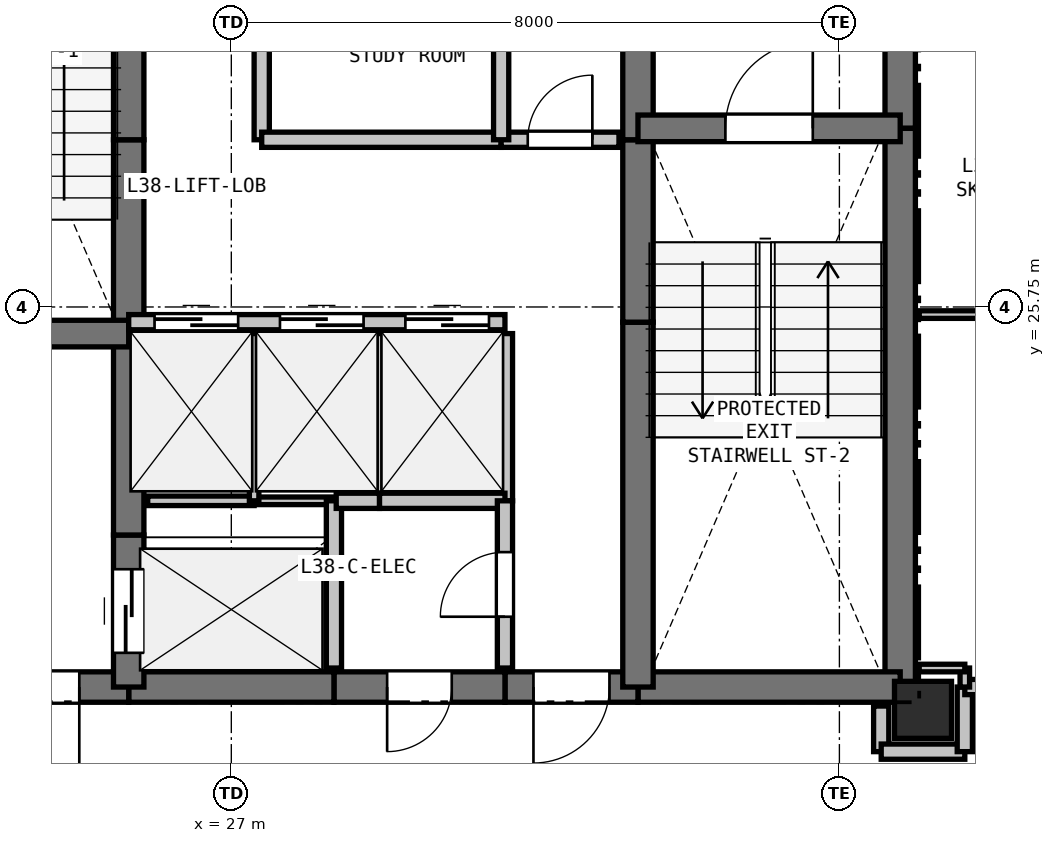
"""IFC4 building model, lengths in metres.
Left out: names, types, materials, properties, quantities, classifications, styles, units other than length and angle.
Written with IfcOpenShell. Run it as: python <this file> out.ifc"""

import sys

from ifc_helpers import new_model, si_unit, direction, frame, frame_2d, origin, origin_2d, place, context, subcontext, project, spatial, rectangle, extrude, element, fill, save


model = new_model("IFC4")
c1 = context("Model", 3, precision=1e-05, world=origin(), true_north=direction((0.0, 1.0)))
c2 = subcontext(c1, "Body", "Model", "MODEL_VIEW")
j1 = project(units=[si_unit("LENGTHUNIT", "METRE"), si_unit("PLANEANGLEUNIT", "RADIAN")], contexts=[c1])
p1 = place(None, origin())
s1 = spatial("IfcSite", under=j1, at=p1, CompositionType="ELEMENT")
p2 = place(p1, origin())
s2 = spatial("IfcBuilding", under=s1, at=p2, CompositionType="ELEMENT")
p3 = place(p2, frame((0.0, 0.0, 137.7)))
s3 = spatial("IfcBuildingStorey", under=s2, at=p3, CompositionType="ELEMENT", Elevation=137.7)
p4 = place(p3, frame((36.1, 20.45, 0.0), z_axis=(0.0, 0.0, 1.0), x_axis=(1.0, 0.0, 0.0)))
e1 = element("IfcColumn", 1, at=p4, inside=s3, PredefinedType="COLUMN", context=c2, shape_type="SweptSolid", body=[
    extrude(rectangle(XDim=0.75, YDim=0.75, at=origin_2d()), origin(), (0.0, 0.0, 1.0), 3.3),
])
p5 = place(p3, frame((35.8, 32.75, 0.0), z_axis=(0.0, 0.0, 1.0), x_axis=(0.0, -1.0, 0.0)))
e2 = element("IfcWall", 2, at=p5, inside=s3, PredefinedType="SHEAR", context=c2, shape_type="SweptSolid", body=[
    extrude(rectangle(XDim=4.65, YDim=0.4, at=frame_2d((2.325, 0.0))), origin(), (0.0, 0.0, 1.0), 3.06),
])
p6 = place(p3, frame((35.8, 28.1, 0.0), z_axis=(0.0, 0.0, 1.0), x_axis=(0.0, -1.0, 0.0)))
e3 = element("IfcWall", 3, at=p6, inside=s3, PredefinedType="SHEAR", context=c2, shape_type="SweptSolid", body=[
    extrude(rectangle(XDim=7.35, YDim=0.4, at=frame_2d((3.675, 0.0))), origin(), (0.0, 0.0, 1.0), 3.06),
])
p7 = place(p3, frame((35.8, 20.75, 0.0), z_axis=(0.0, 0.0, 1.0), x_axis=(-1.0, 0.0, 0.0)))
e4 = element("IfcWall", 4, at=p7, inside=s3, PredefinedType="SHEAR", context=c2, shape_type="SweptSolid", body=[
    extrude(rectangle(XDim=3.45, YDim=0.4, at=frame_2d((1.725, 0.0))), origin(), (0.0, 0.0, 1.0), 3.06),
])
p8 = place(p3, frame((32.35, 20.75, 0.0), z_axis=(0.0, 0.0, 1.0), x_axis=(-1.0, 0.0, 0.0)))
e5 = element("IfcWall", 5, at=p8, inside=s3, PredefinedType="SHEAR", context=c2, shape_type="SweptSolid", body=[
    extrude(rectangle(XDim=1.75, YDim=0.4, at=frame_2d((0.875, 0.0))), origin(), (0.0, 0.0, 1.0), 3.06),
])
p9 = place(p8, frame((0.375, 0.0, 0.0)))
e6 = element("IfcOpeningElement", 6, at=p9, cuts=e5, PredefinedType="OPENING", context=c2, shape_type="SweptSolid", body=[
    extrude(rectangle(XDim=1.0, YDim=2.15, at=frame_2d((0.5, 1.075))), frame((0.0, 0.21, 0.0), z_axis=(0.0, -1.0, 0.0), x_axis=(1.0, 0.0, 0.0)), (0.0, 0.0, 1.0), 0.42),
])
p10 = place(p3, frame((30.6, 20.75, 0.0), z_axis=(0.0, 0.0, 1.0), x_axis=(-1.0, 0.0, 0.0)))
e7 = element("IfcWall", 7, at=p10, inside=s3, PredefinedType="SHEAR", context=c2, shape_type="SweptSolid", body=[
    extrude(rectangle(XDim=2.25, YDim=0.4, at=frame_2d((1.125, 0.0))), origin(), (0.0, 0.0, 1.0), 3.06),
])
p11 = place(p10, frame((0.7, 0.0, 0.0)))
e8 = element("IfcOpeningElement", 8, at=p11, cuts=e7, PredefinedType="OPENING", context=c2, shape_type="SweptSolid", body=[
    extrude(rectangle(XDim=0.85, YDim=2.1, at=frame_2d((0.425, 1.05))), frame((0.0, 0.21, 0.0), z_axis=(0.0, -1.0, 0.0), x_axis=(1.0, 0.0, 0.0)), (0.0, 0.0, 1.0), 0.42),
])
p12 = place(p3, frame((28.35, 20.75, 0.0), z_axis=(0.0, 0.0, 1.0), x_axis=(-1.0, 0.0, 0.0)))
e9 = element("IfcWall", 9, at=p12, inside=s3, PredefinedType="SHEAR", context=c2, shape_type="SweptSolid", body=[
    extrude(rectangle(XDim=2.7, YDim=0.4, at=frame_2d((1.35, 0.0))), origin(), (0.0, 0.0, 1.0), 3.06),
])
p13 = place(p3, frame((25.65, 20.75, 0.0), z_axis=(0.0, 0.0, 1.0), x_axis=(-1.0, 0.0, 0.0)))
e10 = element("IfcWall", 10, at=p13, inside=s3, PredefinedType="SHEAR", context=c2, shape_type="SweptSolid", body=[
    extrude(rectangle(XDim=3.45, YDim=0.4, at=frame_2d((1.725, 0.0))), origin(), (0.0, 0.0, 1.0), 3.06),
])
p14 = place(p13, frame((0.65, 0.0, 0.0)))
e11 = element("IfcOpeningElement", 11, at=p14, cuts=e10, PredefinedType="OPENING", context=c2, shape_type="SweptSolid", body=[
    extrude(rectangle(XDim=1.15, YDim=2.15, at=frame_2d((0.575, 1.075))), frame((0.0, 0.21, 0.0), z_axis=(0.0, -1.0, 0.0), x_axis=(1.0, 0.0, 0.0)), (0.0, 0.0, 1.0), 0.42),
])
p15 = place(p3, frame((25.65, 20.75, 0.0), z_axis=(0.0, 0.0, 1.0), x_axis=(0.0, 1.0, 0.0)))
e12 = element("IfcWall", 12, at=p15, inside=s3, PredefinedType="SHEAR", context=c2, shape_type="SweptSolid", body=[
    extrude(rectangle(XDim=2.0, YDim=0.4, at=frame_2d((1.0, 0.0))), origin(), (0.0, 0.0, 1.0), 3.06),
])
p16 = place(p15, frame((0.45, 0.0, 0.0)))
e13 = element("IfcOpeningElement", 13, at=p16, cuts=e12, PredefinedType="OPENING", context=c2, shape_type="SweptSolid", body=[
    extrude(rectangle(XDim=1.1, YDim=2.15, at=frame_2d((0.55, 1.075))), frame((0.0, 0.21, 0.0), z_axis=(0.0, -1.0, 0.0), x_axis=(1.0, 0.0, 0.0)), (0.0, 0.0, 1.0), 0.42),
])
p17 = place(p3, frame((25.65, 22.75, 0.0), z_axis=(0.0, 0.0, 1.0), x_axis=(0.0, 1.0, 0.0)))
e14 = element("IfcWall", 14, at=p17, inside=s3, PredefinedType="SHEAR", context=c2, shape_type="SweptSolid", body=[
    extrude(rectangle(XDim=2.8, YDim=0.4, at=frame_2d((1.4, 0.0))), origin(), (0.0, 0.0, 1.0), 3.06),
])
p18 = place(p3, frame((25.65, 25.55, 0.0), z_axis=(0.0, 0.0, 1.0), x_axis=(0.0, 1.0, 0.0)))
e15 = element("IfcWall", 15, at=p18, inside=s3, PredefinedType="SHEAR", context=c2, shape_type="SweptSolid", body=[
    extrude(rectangle(XDim=2.4, YDim=0.4, at=frame_2d((1.2, 0.0))), origin(), (0.0, 0.0, 1.0), 3.06),
])
for number, where, z_axis, x_axis in (
    (16, (25.65, 27.95, 0.0), (0.0, 0.0, 1.0), (0.0, 1.0, 0.0)),
    (17, (32.35, 20.75, 0.0), (0.0, 0.0, 1.0), (0.0, 1.0, 0.0)),
):
    element("IfcWall", number, at=place(p3, frame(where, z_axis=z_axis, x_axis=x_axis)), inside=s3, PredefinedType="SHEAR", context=c2, shape_type="SweptSolid", body=[
        extrude(rectangle(XDim=4.8, YDim=0.4, at=frame_2d((2.4, 0.0))), origin(), (0.0, 0.0, 1.0), 3.06),
    ])
p19 = place(p3, frame((32.35, 25.55, 0.0), z_axis=(0.0, 0.0, 1.0), x_axis=(0.0, 1.0, 0.0)))
e18 = element("IfcWall", 18, at=p19, inside=s3, PredefinedType="SHEAR", context=c2, shape_type="SweptSolid", body=[
    extrude(rectangle(XDim=2.4, YDim=0.4, at=frame_2d((1.2, 0.0))), origin(), (0.0, 0.0, 1.0), 3.06),
])
p20 = place(p3, frame((32.35, 27.95, 0.0), z_axis=(0.0, 0.0, 1.0), x_axis=(0.0, 1.0, 0.0)))
e19 = element("IfcWall", 19, at=p20, inside=s3, PredefinedType="SHEAR", context=c2, shape_type="SweptSolid", body=[
    extrude(rectangle(XDim=2.8, YDim=0.4, at=frame_2d((1.4, 0.0))), origin(), (0.0, 0.0, 1.0), 3.06),
])
p21 = place(p3, frame((22.2, 25.4, 0.0), z_axis=(0.0, 0.0, 1.0), x_axis=(1.0, 0.0, 0.0)))
e20 = element("IfcWall", 20, at=p21, inside=s3, PredefinedType="SHEAR", context=c2, shape_type="SweptSolid", body=[
    extrude(rectangle(XDim=3.45, YDim=0.35, at=frame_2d((1.725, 0.0))), origin(), (0.0, 0.0, 1.0), 3.06),
])
p22 = place(p21, frame((1.15, 0.0, 0.0)))
e21 = element("IfcOpeningElement", 21, at=p22, cuts=e20, PredefinedType="OPENING", context=c2, shape_type="SweptSolid", body=[
    extrude(rectangle(XDim=1.15, YDim=2.15, at=frame_2d((0.575, 1.075))), frame((0.0, 0.185, 0.0), z_axis=(0.0, -1.0, 0.0), x_axis=(1.0, 0.0, 0.0)), (0.0, 0.0, 1.0), 0.37),
])
p23 = place(p3, frame((32.35, 28.1, 0.0), z_axis=(0.0, 0.0, 1.0), x_axis=(1.0, 0.0, 0.0)))
e22 = element("IfcWall", 22, at=p23, inside=s3, PredefinedType="SHEAR", context=c2, shape_type="SweptSolid", body=[
    extrude(rectangle(XDim=3.45, YDim=0.35, at=frame_2d((1.725, 0.0))), origin(), (0.0, 0.0, 1.0), 3.06),
])
p24 = place(p23, frame((1.15, 0.0, 0.0)))
e23 = element("IfcOpeningElement", 23, at=p24, cuts=e22, PredefinedType="OPENING", context=c2, shape_type="SweptSolid", body=[
    extrude(rectangle(XDim=1.15, YDim=2.15, at=frame_2d((0.575, 1.075))), frame((0.0, 0.185, 0.0), z_axis=(0.0, -1.0, 0.0), x_axis=(1.0, 0.0, 0.0)), (0.0, 0.0, 1.0), 0.37),
])
p25 = place(p3, frame((25.65, 25.55, 0.0), z_axis=(0.0, 0.0, 1.0), x_axis=(1.0, 0.0, 0.0)))
e24 = element("IfcWall", 24, at=p25, inside=s3, PredefinedType="PARTITIONING", context=c2, shape_type="SweptSolid", body=[
    extrude(rectangle(XDim=4.95, YDim=0.2, at=frame_2d((2.475, 0.0))), origin(), (0.0, 0.0, 1.0), 3.06),
])
p26 = place(p25, frame((0.34, 0.0, 0.0)))
e25 = element("IfcOpeningElement", 25, at=p26, cuts=e24, PredefinedType="OPENING", context=c2, shape_type="SweptSolid", body=[
    extrude(rectangle(XDim=1.1, YDim=2.15, at=frame_2d((0.55, 1.075))), frame((0.0, 0.11, 0.0), z_axis=(0.0, -1.0, 0.0), x_axis=(1.0, 0.0, 0.0)), (0.0, 0.0, 1.0), 0.22),
])
p27 = place(p25, frame((1.99, 0.0, 0.0)))
e26 = element("IfcOpeningElement", 26, at=p27, cuts=e24, PredefinedType="OPENING", context=c2, shape_type="SweptSolid", body=[
    extrude(rectangle(XDim=1.1, YDim=2.15, at=frame_2d((0.55, 1.075))), frame((0.0, 0.11, 0.0), z_axis=(0.0, -1.0, 0.0), x_axis=(1.0, 0.0, 0.0)), (0.0, 0.0, 1.0), 0.22),
])
p28 = place(p25, frame((3.64, 0.0, 0.0)))
e27 = element("IfcOpeningElement", 27, at=p28, cuts=e24, PredefinedType="OPENING", context=c2, shape_type="SweptSolid", body=[
    extrude(rectangle(XDim=1.1, YDim=2.15, at=frame_2d((0.55, 1.075))), frame((0.0, 0.11, 0.0), z_axis=(0.0, -1.0, 0.0), x_axis=(1.0, 0.0, 0.0)), (0.0, 0.0, 1.0), 0.22),
])
p29 = place(p3, frame((25.9, 23.2, 0.0), z_axis=(0.0, 0.0, 1.0), x_axis=(1.0, 0.0, 0.0)))
e28 = element("IfcWall", 28, at=p29, inside=s3, PredefinedType="PARTITIONING", context=c2, shape_type="SweptSolid", body=[
    extrude(rectangle(XDim=1.4, YDim=0.125, at=frame_2d((0.7, 0.0))), origin(), (0.0, 0.0, 1.0), 3.06),
])
p30 = place(p3, frame((27.3, 23.2, 0.0), z_axis=(0.0, 0.0, 1.0), x_axis=(1.0, 0.0, 0.0)))
e29 = element("IfcWall", 29, at=p30, inside=s3, PredefinedType="PARTITIONING", context=c2, shape_type="SweptSolid", body=[
    extrude(rectangle(XDim=1.05, YDim=0.1, at=frame_2d((0.525, 0.0))), origin(), (0.0, 0.0, 1.0), 3.06),
])
p31 = place(p3, frame((28.35, 23.2, 0.0), z_axis=(0.0, 0.0, 1.0), x_axis=(0.0, -1.0, 0.0)))
e30 = element("IfcWall", 30, at=p31, inside=s3, PredefinedType="PARTITIONING", context=c2, shape_type="SweptSolid", body=[
    extrude(rectangle(XDim=2.2, YDim=0.2, at=frame_2d((1.1, 0.0))), origin(), (0.0, 0.0, 1.0), 3.06),
])
p32 = place(p3, frame((27.3, 25.4, 0.0), z_axis=(0.0, 0.0, 1.0), x_axis=(0.0, -1.0, 0.0)))
e31 = element("IfcWall", 31, at=p32, inside=s3, PredefinedType="PARTITIONING", context=c2, shape_type="SweptSolid", body=[
    extrude(rectangle(XDim=2.2, YDim=0.125, at=frame_2d((1.1, 0.0))), origin(), (0.0, 0.0, 1.0), 3.06),
])
p33 = place(p3, frame((28.95, 25.4, 0.0), z_axis=(0.0, 0.0, 1.0), x_axis=(0.0, -1.0, 0.0)))
e32 = element("IfcWall", 32, at=p33, inside=s3, PredefinedType="PARTITIONING", context=c2, shape_type="SweptSolid", body=[
    extrude(rectangle(XDim=2.2, YDim=0.1, at=frame_2d((1.1, 0.0))), origin(), (0.0, 0.0, 1.0), 3.06),
])
p34 = place(p3, frame((28.95, 23.2, 0.0), z_axis=(0.0, 0.0, 1.0), x_axis=(-1.0, 0.0, 0.0)))
e33 = element("IfcWall", 33, at=p34, inside=s3, PredefinedType="PARTITIONING", context=c2, shape_type="SweptSolid", body=[
    extrude(rectangle(XDim=0.57, YDim=0.2, at=frame_2d((0.285, 0.0))), origin(), (0.0, 0.0, 1.0), 3.06),
])
p35 = place(p3, frame((30.6, 25.4, 0.0), z_axis=(0.0, 0.0, 1.0), x_axis=(0.0, -1.0, 0.0)))
e34 = element("IfcWall", 34, at=p35, inside=s3, PredefinedType="PARTITIONING", context=c2, shape_type="SweptSolid", body=[
    extrude(rectangle(XDim=2.2, YDim=0.2, at=frame_2d((1.1, 0.0))), origin(), (0.0, 0.0, 1.0), 3.06),
])
p36 = place(p3, frame((30.6, 23.2, 0.0), z_axis=(0.0, 0.0, 1.0), x_axis=(-1.0, 0.0, 0.0)))
e35 = element("IfcWall", 35, at=p36, inside=s3, PredefinedType="PARTITIONING", context=c2, shape_type="SweptSolid", body=[
    extrude(rectangle(XDim=1.65, YDim=0.2, at=frame_2d((0.825, 0.0))), origin(), (0.0, 0.0, 1.0), 3.06),
])
p37 = place(p3, frame((30.6, 21.0, 0.0), z_axis=(0.0, 0.0, 1.0), x_axis=(0.0, 1.0, 0.0)))
e36 = element("IfcWall", 36, at=p37, inside=s3, PredefinedType="PARTITIONING", context=c2, shape_type="SweptSolid", body=[
    extrude(rectangle(XDim=2.2, YDim=0.2, at=frame_2d((1.1, 0.0))), origin(), (0.0, 0.0, 1.0), 3.06),
])
p38 = place(p37, frame((0.675, 0.0, 0.0)))
e37 = element("IfcOpeningElement", 37, at=p38, cuts=e36, PredefinedType="OPENING", context=c2, shape_type="SweptSolid", body=[
    extrude(rectangle(XDim=0.85, YDim=2.1, at=frame_2d((0.425, 1.05))), frame((0.0, 0.11, 0.0), z_axis=(0.0, -1.0, 0.0), x_axis=(1.0, 0.0, 0.0)), (0.0, 0.0, 1.0), 0.22),
])
p39 = place(p3, frame((27.4, 32.5, 0.0), z_axis=(0.0, 0.0, 1.0), x_axis=(0.0, -1.0, 0.0)))
e38 = element("IfcWall", 38, at=p39, inside=s3, PredefinedType="PARTITIONING", context=c2, shape_type="SweptSolid", body=[
    extrude(rectangle(XDim=4.55, YDim=0.2, at=frame_2d((2.275, 0.0))), origin(), (0.0, 0.0, 1.0), 3.06),
])
p40 = place(p39, frame((1.775, 0.0, 0.0)))
e39 = element("IfcOpeningElement", 39, at=p40, cuts=e38, PredefinedType="OPENING", context=c2, shape_type="SweptSolid", body=[
    extrude(rectangle(XDim=1.0, YDim=2.15, at=frame_2d((0.5, 1.075))), frame((0.0, 0.11, 0.0), z_axis=(0.0, -1.0, 0.0), x_axis=(1.0, 0.0, 0.0)), (0.0, 0.0, 1.0), 0.22),
])
p41 = place(p3, frame((27.4, 27.95, 0.0), z_axis=(0.0, 0.0, 1.0), x_axis=(1.0, 0.0, 0.0)))
e40 = element("IfcWall", 40, at=p41, inside=s3, PredefinedType="PARTITIONING", context=c2, shape_type="SweptSolid", body=[
    extrude(rectangle(XDim=3.15, YDim=0.2, at=frame_2d((1.575, 0.0))), origin(), (0.0, 0.0, 1.0), 3.06),
])
p42 = place(p3, frame((30.55, 27.95, 0.0), z_axis=(0.0, 0.0, 1.0), x_axis=(1.0, 0.0, 0.0)))
e41 = element("IfcWall", 41, at=p42, inside=s3, PredefinedType="PARTITIONING", context=c2, shape_type="SweptSolid", body=[
    extrude(rectangle(XDim=1.55, YDim=0.2, at=frame_2d((0.775, 0.0))), origin(), (0.0, 0.0, 1.0), 3.06),
])
p43 = place(p42, frame((0.35, 0.0, 0.0)))
e42 = element("IfcOpeningElement", 42, at=p43, cuts=e41, PredefinedType="OPENING", context=c2, shape_type="SweptSolid", body=[
    extrude(rectangle(XDim=0.85, YDim=2.1, at=frame_2d((0.425, 1.05))), frame((0.0, 0.11, 0.0), z_axis=(0.0, -1.0, 0.0), x_axis=(1.0, 0.0, 0.0)), (0.0, 0.0, 1.0), 0.22),
])
p44 = place(p3, frame((35.55, 20.5, 0.0), z_axis=(0.0, 0.0, 1.0), x_axis=(0.0, -1.0, 0.0)))
e43 = element("IfcWall", 43, at=p44, inside=s3, PredefinedType="PARTITIONING", context=c2, shape_type="SweptSolid", body=[
    extrude(rectangle(XDim=0.6, YDim=0.2, at=frame_2d((0.3, 0.0))), origin(), (0.0, 0.0, 1.0), 2.508),
])
p45 = place(p3, frame((35.55, 19.9, 0.0), z_axis=(0.0, 0.0, 1.0), x_axis=(1.0, 0.0, 0.0)))
e44 = element("IfcWall", 44, at=p45, inside=s3, PredefinedType="PARTITIONING", context=c2, shape_type="SweptSolid", body=[
    extrude(rectangle(XDim=1.1, YDim=0.2, at=frame_2d((0.55, 0.0))), origin(), (0.0, 0.0, 1.0), 2.433),
])
p46 = place(p3, frame((36.65, 19.9, 0.0), z_axis=(0.0, 0.0, 1.0), x_axis=(0.0, 1.0, 0.0)))
e45 = element("IfcWall", 45, at=p46, inside=s3, PredefinedType="PARTITIONING", context=c2, shape_type="SweptSolid", body=[
    extrude(rectangle(XDim=0.85, YDim=0.2, at=frame_2d((0.425, 0.0))), origin(), (0.0, 0.0, 1.0), 3.06),
])
p47 = place(p3, frame((36.65, 20.75, 0.0), z_axis=(0.0, 0.0, 1.0), x_axis=(1.0, 0.0, 0.0)))
e46 = element("IfcWall", 46, at=p47, inside=s3, PredefinedType="PARTITIONING", context=c2, shape_type="SweptSolid", body=[
    extrude(rectangle(XDim=2.55, YDim=0.2, at=frame_2d((1.275, 0.0))), origin(), (0.0, 0.0, 1.0), 3.06),
])
p48 = place(p47, frame((0.775, 0.0, 0.0)))
e47 = element("IfcOpeningElement", 47, at=p48, cuts=e46, PredefinedType="OPENING", context=c2, shape_type="SweptSolid", body=[
    extrude(rectangle(XDim=1.0, YDim=2.15, at=frame_2d((0.5, 1.075))), frame((0.0, 0.11, 0.0), z_axis=(0.0, -1.0, 0.0), x_axis=(1.0, 0.0, 0.0)), (0.0, 0.0, 1.0), 0.22),
])
p49 = place(p3, frame((30.55, 30.3, 0.0), z_axis=(0.0, 0.0, 1.0), x_axis=(0.0, -1.0, 0.0)))
e48 = element("IfcWall", 48, at=p49, inside=s3, PredefinedType="PARTITIONING", context=c2, shape_type="SweptSolid", body=[
    extrude(rectangle(XDim=2.35, YDim=0.2, at=frame_2d((1.175, 0.0))), origin(), (0.0, 0.0, 1.0), 3.06),
])
p50 = place(p3, frame((42.181, 25.65, 0.0), z_axis=(0.0, 0.0, 1.0), x_axis=(-1.0, 0.0, 0.0)))
e49 = element("IfcWall", 49, at=p50, inside=s3, PredefinedType="PARTITIONING", context=c2, shape_type="SweptSolid", body=[
    extrude(rectangle(XDim=6.131, YDim=0.1, at=frame_2d((3.065, 0.0))), origin(), (0.0, 0.0, 1.0), 2.365),
])
p51 = place(p3, frame((36.65, 20.75, 0.0), z_axis=(0.0, 0.0, 1.0), x_axis=(0.0, 1.0, 0.0)))
e50 = element("IfcWall", 50, at=p51, inside=s3, PredefinedType="PARTITIONING", context=c2, shape_type="SweptSolid", body=[
    extrude(rectangle(XDim=0.25, YDim=0.125, at=frame_2d((0.125, 0.0))), origin(), (0.0, 0.0, 1.0), 3.06),
])
p52 = place(p3, frame((36.65, 21.0, 0.0), z_axis=(0.0, 0.0, 1.0), x_axis=(-1.0, 0.0, 0.0)))
e51 = element("IfcWall", 51, at=p52, inside=s3, PredefinedType="PARTITIONING", context=c2, shape_type="SweptSolid", body=[
    extrude(rectangle(XDim=0.6, YDim=0.1, at=frame_2d((0.3, 0.0))), origin(), (0.0, 0.0, 1.0), 2.508),
])
p53 = place(p26, origin())
e52 = element("IfcDoor", 52, at=p53, inside=s3, OperationType="SLIDING_TO_LEFT", PredefinedType="DOOR", context=c2, shape_type="SweptSolid", body=[
    extrude(rectangle(XDim=1.1, YDim=2.15, at=frame_2d((0.55, 1.075))), frame((0.0, 0.025, 0.0), z_axis=(0.0, -1.0, 0.0), x_axis=(1.0, 0.0, 0.0)), (0.0, 0.0, 1.0), 0.05),
])
fill(e25, e52)
p54 = place(p27, origin())
e53 = element("IfcDoor", 53, at=p54, inside=s3, OperationType="SLIDING_TO_LEFT", PredefinedType="DOOR", context=c2, shape_type="SweptSolid", body=[
    extrude(rectangle(XDim=1.1, YDim=2.15, at=frame_2d((0.55, 1.075))), frame((0.0, 0.025, 0.0), z_axis=(0.0, -1.0, 0.0), x_axis=(1.0, 0.0, 0.0)), (0.0, 0.0, 1.0), 0.05),
])
fill(e26, e53)
p55 = place(p28, origin())
e54 = element("IfcDoor", 54, at=p55, inside=s3, OperationType="SLIDING_TO_LEFT", PredefinedType="DOOR", context=c2, shape_type="SweptSolid", body=[
    extrude(rectangle(XDim=1.1, YDim=2.15, at=frame_2d((0.55, 1.075))), frame((0.0, 0.025, 0.0), z_axis=(0.0, -1.0, 0.0), x_axis=(1.0, 0.0, 0.0)), (0.0, 0.0, 1.0), 0.05),
])
fill(e27, e54)
p56 = place(p9, origin())
e55 = element("IfcDoor", 55, at=p56, inside=s3, OperationType="SINGLE_SWING_RIGHT", PredefinedType="DOOR", context=c2, shape_type="SweptSolid", body=[
    extrude(rectangle(XDim=1.0, YDim=2.15, at=frame_2d((0.5, 1.075))), frame((0.0, 0.025, 0.0), z_axis=(0.0, -1.0, 0.0), x_axis=(1.0, 0.0, 0.0)), (0.0, 0.0, 1.0), 0.05),
])
fill(e6, e55)
p57 = place(p16, origin())
e56 = element("IfcDoor", 56, at=p57, inside=s3, OperationType="SLIDING_TO_LEFT", PredefinedType="DOOR", context=c2, shape_type="SweptSolid", body=[
    extrude(rectangle(XDim=1.1, YDim=2.15, at=frame_2d((0.55, 1.075))), frame((0.0, 0.025, 0.0), z_axis=(0.0, -1.0, 0.0), x_axis=(1.0, 0.0, 0.0)), (0.0, 0.0, 1.0), 0.05),
])
fill(e13, e56)
p58 = place(p24, origin())
e57 = element("IfcDoor", 57, at=p58, inside=s3, OperationType="SINGLE_SWING_RIGHT", PredefinedType="DOOR", context=c2, shape_type="SweptSolid", body=[
    extrude(rectangle(XDim=1.15, YDim=2.15, at=frame_2d((0.575, 1.075))), frame((0.0, 0.025, 0.0), z_axis=(0.0, -1.0, 0.0), x_axis=(1.0, 0.0, 0.0)), (0.0, 0.0, 1.0), 0.05),
])
fill(e23, e57)
p59 = place(p14, origin())
e58 = element("IfcDoor", 58, at=p59, inside=s3, OperationType="SINGLE_SWING_LEFT", PredefinedType="DOOR", context=c2, shape_type="SweptSolid", body=[
    extrude(rectangle(XDim=1.15, YDim=2.15, at=frame_2d((0.575, 1.075))), frame((0.0, 0.025, 0.0), z_axis=(0.0, -1.0, 0.0), x_axis=(1.0, 0.0, 0.0)), (0.0, 0.0, 1.0), 0.05),
])
fill(e11, e58)
p60 = place(p43, origin())
e59 = element("IfcDoor", 59, at=p60, inside=s3, OperationType="SINGLE_SWING_RIGHT", PredefinedType="DOOR", context=c2, shape_type="SweptSolid", body=[
    extrude(rectangle(XDim=0.85, YDim=2.1, at=frame_2d((0.425, 1.05))), frame((0.0, 0.025, 0.0), z_axis=(0.0, -1.0, 0.0), x_axis=(1.0, 0.0, 0.0)), (0.0, 0.0, 1.0), 0.05),
])
fill(e42, e59)
p61 = place(p38, origin())
e60 = element("IfcDoor", 60, at=p61, inside=s3, OperationType="SINGLE_SWING_LEFT", PredefinedType="DOOR", context=c2, shape_type="SweptSolid", body=[
    extrude(rectangle(XDim=0.85, YDim=2.1, at=frame_2d((0.425, 1.05))), frame((0.0, 0.025, 0.0), z_axis=(0.0, -1.0, 0.0), x_axis=(1.0, 0.0, 0.0)), (0.0, 0.0, 1.0), 0.05),
])
fill(e37, e60)
p62 = place(p11, origin())
e61 = element("IfcDoor", 61, at=p62, inside=s3, OperationType="SINGLE_SWING_RIGHT", PredefinedType="DOOR", context=c2, shape_type="SweptSolid", body=[
    extrude(rectangle(XDim=0.85, YDim=2.1, at=frame_2d((0.425, 1.05))), frame((0.0, 0.025, 0.0), z_axis=(0.0, -1.0, 0.0), x_axis=(1.0, 0.0, 0.0)), (0.0, 0.0, 1.0), 0.05),
])
fill(e8, e61)
save(model, sys.argv[1])
